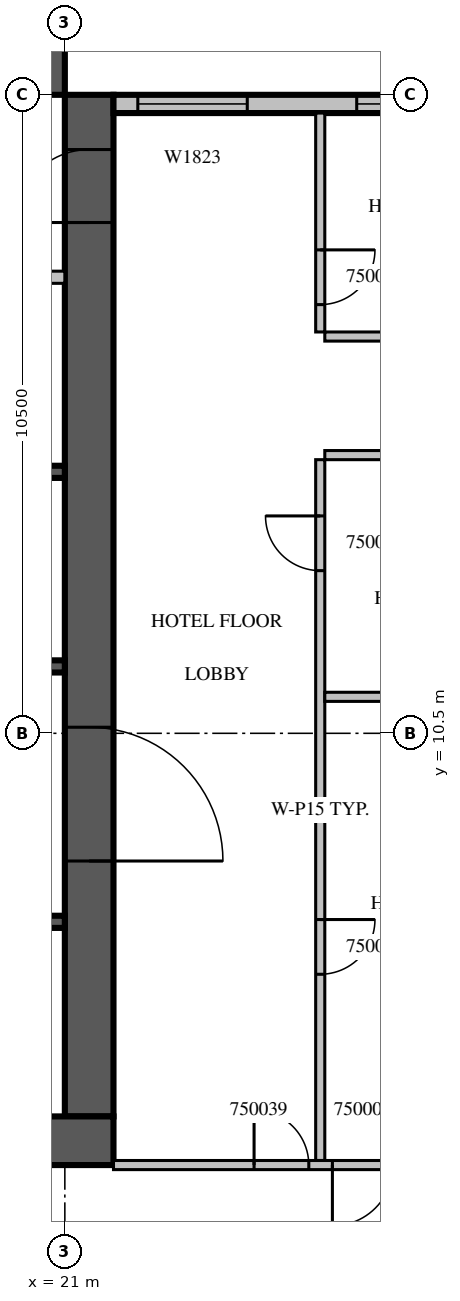
"""IFC4 building model, lengths in metres.
Left out: names, types, materials, properties, quantities, classifications, styles, units other than length and angle.
Written with IfcOpenShell. Run it as: python <this file> out.ifc"""

import sys

from ifc_helpers import new_model, si_unit, direction, frame, frame_2d, origin, place, context, subcontext, project, spatial, rectangle, extrude, source, transform, mapped, element, fill, save


model = new_model("IFC4")
c1 = context("Model", 3, precision=1e-05, world=origin(), true_north=direction((0.0, 1.0)))
c2 = subcontext(c1, "Body", "Model", "MODEL_VIEW")
j1 = project(units=[si_unit("LENGTHUNIT", "METRE"), si_unit("PLANEANGLEUNIT", "RADIAN")], contexts=[c1])
p1 = place(None, origin())
s1 = spatial("IfcSite", under=j1, at=p1, CompositionType="ELEMENT")
p2 = place(p1, origin())
s2 = spatial("IfcBuilding", under=s1, at=p2, CompositionType="ELEMENT")
p3 = place(p2, frame((0.0, 0.0, 223.4)))
s3 = spatial("IfcBuildingStorey", under=s2, at=p3, CompositionType="ELEMENT", Elevation=223.4)
m1 = source(origin(), c2, "Body", "SweptSolid", [
    extrude(rectangle(XDim=16.8, YDim=0.8, at=frame_2d((8.4, 0.0))), origin(), (0.0, 0.0, 1.0), 3.8),
])
p4 = place(p3, frame((21.4, 4.2, 0.0), z_axis=(0.0, 0.0, 1.0), x_axis=(0.0, 1.0, 0.0)))
e1 = element("IfcWall", 1, at=p4, inside=s3, PredefinedType="SHEAR", context=c2, shape_type="MappedRepresentation", body=[
    mapped(m1, transform((0.0, 0.0, 0.0), scale=1.0)),
])
m2 = source(origin(), c2, "Body", "SweptSolid", [
    extrude(rectangle(XDim=2.2, YDim=2.1, at=frame_2d((1.1, 1.05))), frame((0.0, 0.41, 0.0), z_axis=(0.0, -1.0, 0.0), x_axis=(1.0, 0.0, 0.0)), (0.0, 0.0, 1.0), 0.82),
])
p5 = place(p4, frame((4.2, 0.0, 0.0)))
e2 = element("IfcOpeningElement", 2, at=p5, cuts=e1, PredefinedType="OPENING", context=c2, shape_type="MappedRepresentation", body=[
    mapped(m2, transform((0.0, 0.0, 0.0), scale=1.0)),
])
m3 = source(origin(), c2, "Body", "SweptSolid", [
    extrude(rectangle(XDim=1.2, YDim=2.1, at=frame_2d((0.6, 1.05))), frame((0.0, 0.41, 0.0), z_axis=(0.0, -1.0, 0.0), x_axis=(1.0, 0.0, 0.0)), (0.0, 0.0, 1.0), 0.82),
])
p6 = place(p4, frame((14.7, 0.0, 0.0)))
e3 = element("IfcOpeningElement", 3, at=p6, cuts=e1, PredefinedType="OPENING", context=c2, shape_type="MappedRepresentation", body=[
    mapped(m3, transform((0.0, 0.0, 0.0), scale=1.0)),
])
m4 = source(origin(), c2, "Body", "SweptSolid", [
    extrude(rectangle(XDim=17.6, YDim=0.8, at=frame_2d((8.8, 0.0))), origin(), (0.0, 0.0, 1.0), 3.8),
])
p7 = place(p3, frame((4.2, 3.8, 0.0), z_axis=(0.0, 0.0, 1.0), x_axis=(1.0, 0.0, 0.0)))
e4 = element("IfcWall", 4, at=p7, inside=s3, PredefinedType="SHEAR", context=c2, shape_type="MappedRepresentation", body=[
    mapped(m4, transform((0.0, 0.0, 0.0), scale=1.0)),
])
m5 = source(origin(), c2, "Body", "SweptSolid", [
    extrude(rectangle(XDim=0.9, YDim=2.1, at=frame_2d((0.45, 1.05))), frame((0.0, 0.41, 0.0), z_axis=(0.0, -1.0, 0.0), x_axis=(1.0, 0.0, 0.0)), (0.0, 0.0, 1.0), 0.82),
])
p8 = place(p7, frame((12.75, 0.0, 0.0)))
e5 = element("IfcOpeningElement", 5, at=p8, cuts=e4, PredefinedType="OPENING", context=c2, shape_type="MappedRepresentation", body=[
    mapped(m5, transform((0.0, 0.0, 0.0), scale=1.0)),
])
p9 = place(p3, frame((4.2, 21.4, 0.0), z_axis=(0.0, 0.0, 1.0), x_axis=(1.0, 0.0, 0.0)))
e6 = element("IfcWall", 6, at=p9, inside=s3, PredefinedType="SHEAR", context=c2, shape_type="MappedRepresentation", body=[
    mapped(m1, transform((0.0, 0.0, 0.0), scale=1.0)),
])
p10 = place(p9, frame((6.2, 0.0, 0.0)))
e7 = element("IfcOpeningElement", 7, at=p10, cuts=e6, PredefinedType="OPENING", context=c2, shape_type="MappedRepresentation", body=[
    mapped(m3, transform((0.0, 0.0, 0.0), scale=1.0)),
])
m6 = source(origin(), c2, "Body", "SweptSolid", [
    extrude(rectangle(XDim=7.15, YDim=0.3, at=frame_2d((3.575, 0.0))), origin(), (0.0, 0.0, 1.0), 3.4),
])
p11 = place(p3, frame((28.95, 20.85, 0.0), z_axis=(0.0, 0.0, 1.0), x_axis=(-1.0, 0.0, 0.0)))
e8 = element("IfcWall", 8, at=p11, inside=s3, PredefinedType="STANDARD", context=c2, shape_type="MappedRepresentation", body=[
    mapped(m6, transform((0.0, 0.0, 0.0), scale=1.0)),
])
m7 = source(origin(), c2, "Body", "SweptSolid", [
    extrude(rectangle(XDim=3.0, YDim=2.3, at=frame_2d((1.5, 1.15))), frame((0.0, 0.16, 0.0), z_axis=(0.0, -1.0, 0.0), x_axis=(1.0, 0.0, 0.0)), (0.0, 0.0, 1.0), 0.32),
])
p12 = place(p11, frame((0.15, 0.0, 0.6)))
e9 = element("IfcOpeningElement", 9, at=p12, cuts=e8, PredefinedType="OPENING", context=c2, shape_type="MappedRepresentation", body=[
    mapped(m7, transform((0.0, 0.0, 0.0), scale=1.0)),
])
m8 = source(origin(), c2, "Body", "SweptSolid", [
    extrude(rectangle(XDim=1.8, YDim=2.3, at=frame_2d((0.9, 1.15))), frame((0.0, 0.16, 0.0), z_axis=(0.0, -1.0, 0.0), x_axis=(1.0, 0.0, 0.0)), (0.0, 0.0, 1.0), 0.32),
])
p13 = place(p11, frame((4.95, 0.0, 0.6)))
e10 = element("IfcOpeningElement", 10, at=p13, cuts=e8, PredefinedType="OPENING", context=c2, shape_type="MappedRepresentation", body=[
    mapped(m8, transform((0.0, 0.0, 0.0), scale=1.0)),
])
m9 = source(origin(), c2, "Body", "SweptSolid", [
    extrude(rectangle(XDim=2.4, YDim=0.2, at=frame_2d((1.2, 0.0))), origin(), (0.0, 0.0, 1.0), 3.8),
])
p14 = place(p3, frame((18.6, 7.4, 0.0), z_axis=(0.0, 0.0, 1.0), x_axis=(1.0, 0.0, 0.0)))
e11 = element("IfcWall", 11, at=p14, inside=s3, PredefinedType="SOLIDWALL", context=c2, shape_type="MappedRepresentation", body=[
    mapped(m9, transform((0.0, 0.0, 0.0), scale=1.0)),
])
m10 = source(origin(), c2, "Body", "SweptSolid", [
    extrude(rectangle(XDim=9.6, YDim=0.2, at=frame_2d((4.8, 0.0))), origin(), (0.0, 0.0, 1.0), 3.8),
])
p15 = place(p3, frame((11.4, 11.6, 0.0), z_axis=(0.0, 0.0, 1.0), x_axis=(1.0, 0.0, 0.0)))
e12 = element("IfcWall", 12, at=p15, inside=s3, PredefinedType="SOLIDWALL", context=c2, shape_type="MappedRepresentation", body=[
    mapped(m10, transform((0.0, 0.0, 0.0), scale=1.0)),
])
p16 = place(p3, frame((11.4, 14.8, 0.0), z_axis=(0.0, 0.0, 1.0), x_axis=(1.0, 0.0, 0.0)))
e13 = element("IfcWall", 13, at=p16, inside=s3, PredefinedType="SOLIDWALL", context=c2, shape_type="MappedRepresentation", body=[
    mapped(m10, transform((0.0, 0.0, 0.0), scale=1.0)),
])
m11 = source(origin(), c2, "Body", "SweptSolid", [
    extrude(rectangle(XDim=1.1, YDim=2.1, at=frame_2d((0.55, 1.05))), frame((0.0, 0.11, 0.0), z_axis=(0.0, -1.0, 0.0), x_axis=(1.0, 0.0, 0.0)), (0.0, 0.0, 1.0), 0.22),
])
p17 = place(p16, frame((3.05, 0.0, 0.0)))
e14 = element("IfcOpeningElement", 14, at=p17, cuts=e13, PredefinedType="OPENING", context=c2, shape_type="MappedRepresentation", body=[
    mapped(m11, transform((0.0, 0.0, 0.0), scale=1.0)),
])
p18 = place(p16, frame((5.45, 0.0, 0.0)))
e15 = element("IfcOpeningElement", 15, at=p18, cuts=e13, PredefinedType="OPENING", context=c2, shape_type="MappedRepresentation", body=[
    mapped(m11, transform((0.0, 0.0, 0.0), scale=1.0)),
])
p19 = place(p16, frame((7.85, 0.0, 0.0)))
e16 = element("IfcOpeningElement", 16, at=p19, cuts=e13, PredefinedType="OPENING", context=c2, shape_type="MappedRepresentation", body=[
    mapped(m11, transform((0.0, 0.0, 0.0), scale=1.0)),
])
m12 = source(origin(), c2, "Body", "SweptSolid", [
    extrude(rectangle(XDim=11.45, YDim=0.2, at=frame_2d((5.725, 0.0))), origin(), (0.0, 0.0, 1.0), 3.4),
])
p20 = place(p3, frame((9.55, 18.0, 0.0), z_axis=(0.0, 0.0, 1.0), x_axis=(1.0, 0.0, 0.0)))
e17 = element("IfcWall", 17, at=p20, inside=s3, PredefinedType="PARTITIONING", context=c2, shape_type="MappedRepresentation", body=[
    mapped(m12, transform((0.0, 0.0, 0.0), scale=1.0)),
])
m13 = source(origin(), c2, "Body", "SweptSolid", [
    extrude(rectangle(XDim=0.9, YDim=2.1, at=frame_2d((0.45, 1.05))), frame((0.0, 0.11, 0.0), z_axis=(0.0, -1.0, 0.0), x_axis=(1.0, 0.0, 0.0)), (0.0, 0.0, 1.0), 0.22),
])
p21 = place(p20, frame((0.375, 0.0, 0.0)))
e18 = element("IfcOpeningElement", 18, at=p21, cuts=e17, PredefinedType="OPENING", context=c2, shape_type="MappedRepresentation", body=[
    mapped(m13, transform((0.0, 0.0, 0.0), scale=1.0)),
])
p22 = place(p20, frame((1.7, 0.0, 0.0)))
e19 = element("IfcOpeningElement", 19, at=p22, cuts=e17, PredefinedType="OPENING", context=c2, shape_type="MappedRepresentation", body=[
    mapped(m13, transform((0.0, 0.0, 0.0), scale=1.0)),
])
p23 = place(p20, frame((3.075, 0.0, 0.0)))
e20 = element("IfcOpeningElement", 20, at=p23, cuts=e17, PredefinedType="OPENING", context=c2, shape_type="MappedRepresentation", body=[
    mapped(m13, transform((0.0, 0.0, 0.0), scale=1.0)),
])
p24 = place(p20, frame((7.35, 0.0, 0.0)))
e21 = element("IfcOpeningElement", 21, at=p24, cuts=e17, PredefinedType="OPENING", context=c2, shape_type="MappedRepresentation", body=[
    mapped(m11, transform((0.0, 0.0, 0.0), scale=1.0)),
])
m14 = source(origin(), c2, "Body", "SweptSolid", [
    extrude(rectangle(XDim=11.525, YDim=0.15, at=frame_2d((5.763, 0.0))), origin(), (0.0, 0.0, 1.0), 3.4),
])
p25 = place(p3, frame((25.2, 15.0, 0.0), z_axis=(0.0, 0.0, 1.0), x_axis=(0.0, -1.0, 0.0)))
e22 = element("IfcWall", 22, at=p25, inside=s3, PredefinedType="PARTITIONING", context=c2, shape_type="MappedRepresentation", body=[
    mapped(m14, transform((0.0, 0.0, 0.0), scale=1.0)),
])
m15 = source(origin(), c2, "Body", "SweptSolid", [
    extrude(rectangle(XDim=0.9, YDim=2.1, at=frame_2d((0.45, 1.05))), frame((0.0, 0.085, 0.0), z_axis=(0.0, -1.0, 0.0), x_axis=(1.0, 0.0, 0.0)), (0.0, 0.0, 1.0), 0.17),
])
p26 = place(p25, frame((7.562, 0.0, 0.0)))
e23 = element("IfcOpeningElement", 23, at=p26, cuts=e22, PredefinedType="OPENING", context=c2, shape_type="MappedRepresentation", body=[
    mapped(m15, transform((0.0, 0.0, 0.0), scale=1.0)),
])
p27 = place(p25, frame((0.925, 0.0, 0.0)))
e24 = element("IfcOpeningElement", 24, at=p27, cuts=e22, PredefinedType="OPENING", context=c2, shape_type="MappedRepresentation", body=[
    mapped(m15, transform((0.0, 0.0, 0.0), scale=1.0)),
])
m16 = source(origin(), c2, "Body", "SweptSolid", [
    extrude(rectangle(XDim=3.6, YDim=0.15, at=frame_2d((1.8, 0.0))), origin(), (0.0, 0.0, 1.0), 3.4),
])
p28 = place(p3, frame((25.2, 20.7, 0.0), z_axis=(0.0, 0.0, 1.0), x_axis=(0.0, -1.0, 0.0)))
e25 = element("IfcWall", 25, at=p28, inside=s3, PredefinedType="PARTITIONING", context=c2, shape_type="MappedRepresentation", body=[
    mapped(m16, transform((0.0, 0.0, 0.0), scale=1.0)),
])
p29 = place(p28, frame((2.25, 0.0, 0.0)))
e26 = element("IfcOpeningElement", 26, at=p29, cuts=e25, PredefinedType="OPENING", context=c2, shape_type="MappedRepresentation", body=[
    mapped(m15, transform((0.0, 0.0, 0.0), scale=1.0)),
])
p30 = place(p3, frame((29.325, 11.1, 0.0), z_axis=(0.0, 0.0, 1.0), x_axis=(-1.0, 0.0, 0.0)))
e27 = element("IfcWall", 27, at=p30, inside=s3, PredefinedType="PARTITIONING", context=c2, shape_type="SweptSolid", body=[
    extrude(rectangle(XDim=4.05, YDim=0.15, at=frame_2d((2.025, 0.0))), origin(), (0.0, 0.0, 1.0), 3.4),
])
m17 = source(origin(), c2, "Body", "SweptSolid", [
    extrude(rectangle(XDim=4.05, YDim=0.15, at=frame_2d((2.025, 0.0))), origin(), (0.0, 0.0, 1.0), 3.4),
])
for number, where, z_axis, x_axis in (
    (28, (29.325, 15.075, 0.0), (0.0, 0.0, 1.0), (-1.0, 0.0, 0.0)),
    (29, (25.275, 17.025, 0.0), (0.0, 0.0, 1.0), (1.0, 0.0, 0.0)),
):
    element("IfcWall", number, at=place(p3, frame(where, z_axis=z_axis, x_axis=x_axis)), inside=s3, PredefinedType="PARTITIONING", context=c2, shape_type="MappedRepresentation", body=[
        mapped(m17, transform((0.0, 0.0, 0.0), scale=1.0)),
    ])
m18 = source(origin(), c2, "Body", "SweptSolid", [
    extrude(rectangle(XDim=7.525, YDim=0.15, at=frame_2d((3.763, 0.0))), origin(), (0.0, 0.0, 1.0), 3.4),
])
p31 = place(p3, frame((21.8, 3.4, 0.0), z_axis=(0.0, 0.0, 1.0), x_axis=(1.0, 0.0, 0.0)))
e30 = element("IfcWall", 30, at=p31, inside=s3, PredefinedType="PARTITIONING", context=c2, shape_type="MappedRepresentation", body=[
    mapped(m18, transform((0.0, 0.0, 0.0), scale=1.0)),
])
m19 = source(origin(), c2, "Body", "SweptSolid", [
    extrude(rectangle(XDim=1.0, YDim=2.1, at=frame_2d((0.5, 1.05))), frame((0.0, 0.085, 0.0), z_axis=(0.0, -1.0, 0.0), x_axis=(1.0, 0.0, 0.0)), (0.0, 0.0, 1.0), 0.17),
])
p32 = place(p31, frame((3.6, 0.0, 0.0)))
e31 = element("IfcOpeningElement", 31, at=p32, cuts=e30, PredefinedType="OPENING", context=c2, shape_type="MappedRepresentation", body=[
    mapped(m19, transform((0.0, 0.0, 0.0), scale=1.0)),
])
p33 = place(p31, frame((2.312, 0.0, 0.0)))
e32 = element("IfcOpeningElement", 32, at=p33, cuts=e30, PredefinedType="OPENING", context=c2, shape_type="MappedRepresentation", body=[
    mapped(m15, transform((0.0, 0.0, 0.0), scale=1.0)),
])
m20 = source(origin(), c2, "Body", "SweptSolid", [
    extrude(rectangle(XDim=3.0, YDim=2.3, at=frame_2d((1.5, 1.15))), frame((0.0, 0.03, 0.0), z_axis=(0.0, -1.0, 0.0), x_axis=(1.0, 0.0, 0.0)), (0.0, 0.0, 1.0), 0.06),
])
p34 = place(p12, origin())
e33 = element("IfcWindow", 33, at=p34, inside=s3, PartitioningType="SINGLE_PANEL", PredefinedType="WINDOW", context=c2, shape_type="MappedRepresentation", body=[
    mapped(m20, transform((0.0, 0.0, 0.0), scale=1.0)),
])
fill(e9, e33)
m21 = source(origin(), c2, "Body", "SweptSolid", [
    extrude(rectangle(XDim=1.8, YDim=2.3, at=frame_2d((0.9, 1.15))), frame((0.0, 0.03, 0.0), z_axis=(0.0, -1.0, 0.0), x_axis=(1.0, 0.0, 0.0)), (0.0, 0.0, 1.0), 0.06),
])
p35 = place(p13, origin())
e34 = element("IfcWindow", 34, at=p35, inside=s3, PartitioningType="SINGLE_PANEL", PredefinedType="WINDOW", context=c2, shape_type="MappedRepresentation", body=[
    mapped(m21, transform((0.0, 0.0, 0.0), scale=1.0)),
])
fill(e10, e34)
m22 = source(origin(), c2, "Body", "SweptSolid", [
    extrude(rectangle(XDim=2.2, YDim=2.1, at=frame_2d((1.1, 1.05))), frame((0.0, 0.025, 0.0), z_axis=(0.0, -1.0, 0.0), x_axis=(1.0, 0.0, 0.0)), (0.0, 0.0, 1.0), 0.05),
])
p36 = place(p5, origin())
e35 = element("IfcDoor", 35, at=p36, inside=s3, OperationType="DOUBLE_DOOR_SINGLE_SWING", PredefinedType="DOOR", context=c2, shape_type="MappedRepresentation", body=[
    mapped(m22, transform((0.0, 0.0, 0.0), scale=1.0)),
])
fill(e2, e35)
m23 = source(origin(), c2, "Body", "SweptSolid", [
    extrude(rectangle(XDim=1.2, YDim=2.1, at=frame_2d((0.6, 1.05))), frame((0.0, 0.025, 0.0), z_axis=(0.0, -1.0, 0.0), x_axis=(1.0, 0.0, 0.0)), (0.0, 0.0, 1.0), 0.05),
])
p37 = place(p6, origin())
e36 = element("IfcDoor", 36, at=p37, inside=s3, OperationType="SINGLE_SWING_LEFT", PredefinedType="DOOR", context=c2, shape_type="MappedRepresentation", body=[
    mapped(m23, transform((0.0, 0.0, 0.0), scale=1.0)),
])
fill(e3, e36)
m24 = source(origin(), c2, "Body", "SweptSolid", [
    extrude(rectangle(XDim=0.9, YDim=2.1, at=frame_2d((0.45, 1.05))), frame((0.0, 0.025, 0.0), z_axis=(0.0, -1.0, 0.0), x_axis=(1.0, 0.0, 0.0)), (0.0, 0.0, 1.0), 0.05),
])
p38 = place(p26, origin())
e37 = element("IfcDoor", 37, at=p38, inside=s3, OperationType="SINGLE_SWING_LEFT", PredefinedType="DOOR", context=c2, shape_type="MappedRepresentation", body=[
    mapped(m24, transform((0.0, 0.0, 0.0), scale=1.0)),
])
fill(e23, e37)
p39 = place(p27, origin())
e38 = element("IfcDoor", 38, at=p39, inside=s3, OperationType="SINGLE_SWING_RIGHT", PredefinedType="DOOR", context=c2, shape_type="MappedRepresentation", body=[
    mapped(m24, transform((0.0, 0.0, 0.0), scale=1.0)),
])
fill(e24, e38)
p40 = place(p29, origin())
e39 = element("IfcDoor", 39, at=p40, inside=s3, OperationType="SINGLE_SWING_LEFT", PredefinedType="DOOR", context=c2, shape_type="MappedRepresentation", body=[
    mapped(m24, transform((0.0, 0.0, 0.0), scale=1.0)),
])
fill(e26, e39)
m25 = source(origin(), c2, "Body", "SweptSolid", [
    extrude(rectangle(XDim=1.0, YDim=2.1, at=frame_2d((0.5, 1.05))), frame((0.0, 0.025, 0.0), z_axis=(0.0, -1.0, 0.0), x_axis=(1.0, 0.0, 0.0)), (0.0, 0.0, 1.0), 0.05),
])
p41 = place(p32, origin())
e40 = element("IfcDoor", 40, at=p41, inside=s3, OperationType="SINGLE_SWING_RIGHT", PredefinedType="DOOR", context=c2, shape_type="MappedRepresentation", body=[
    mapped(m25, transform((0.0, 0.0, 0.0), scale=1.0)),
])
fill(e31, e40)
p42 = place(p33, origin())
e41 = element("IfcDoor", 41, at=p42, inside=s3, OperationType="SINGLE_SWING_LEFT", PredefinedType="DOOR", context=c2, shape_type="MappedRepresentation", body=[
    mapped(m24, transform((0.0, 0.0, 0.0), scale=1.0)),
])
fill(e32, e41)
save(model, sys.argv[1])
